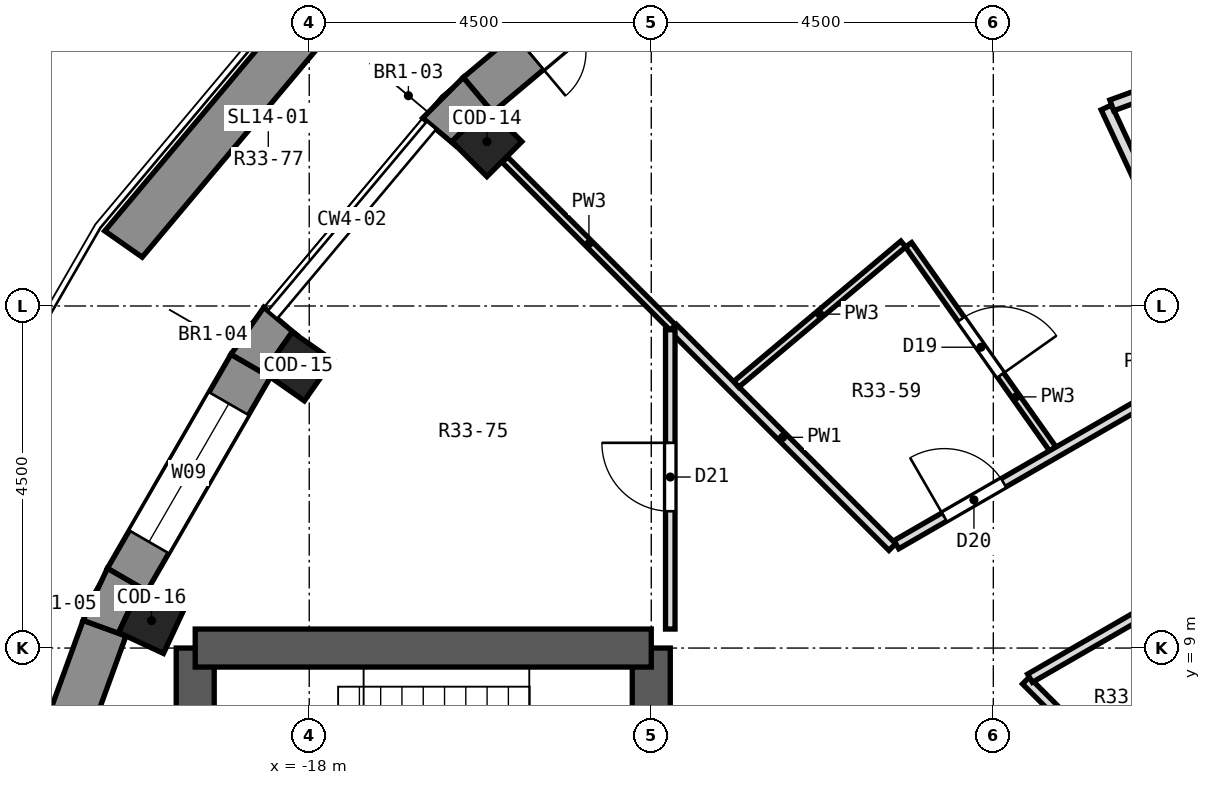
"""IFC4 building model, lengths in metres.
Left out: names, types, materials, properties, quantities, classifications, styles, units other than length and angle.
Written with IfcOpenShell. Run it as: python <this file> out.ifc"""

import sys

from ifc_helpers import new_model, si_unit, direction, frame, frame_2d, origin, origin_2d, place, context, subcontext, project, spatial, polyline, rectangle, outline, extrude, element, fill, save


model = new_model("IFC4")
c1 = context("Model", 3, precision=1e-05, world=origin(), true_north=direction((0.0, 1.0)))
c2 = subcontext(c1, "Body", "Model", "MODEL_VIEW")
j1 = project(units=[si_unit("LENGTHUNIT", "METRE"), si_unit("PLANEANGLEUNIT", "RADIAN")], contexts=[c1])
p1 = place(None, origin())
s1 = spatial("IfcSite", under=j1, at=p1, CompositionType="ELEMENT")
p2 = place(p1, origin())
s2 = spatial("IfcBuilding", under=s1, at=p2, CompositionType="ELEMENT")
p3 = place(p2, frame((0.0, 0.0, 229.7)))
s3 = spatial("IfcBuildingStorey", under=s2, at=p3, CompositionType="ELEMENT", Elevation=229.7)
for number, where, z_axis, x_axis in (
    (1, (-15.662, 15.662, 0.0), (0.0, 0.0, 1.0), (-0.707, 0.707, 0.0)),
    (2, (-18.144, 12.705, 0.0), (0.0, 0.0, 1.0), (-0.819, 0.574, 0.0)),
    (3, (-20.075, 9.361, 0.0), (0.0, 0.0, 1.0), (-0.906, 0.423, 0.0)),
):
    element("IfcColumn", number, at=place(p3, frame(where, z_axis=z_axis, x_axis=x_axis)), inside=s3, PredefinedType="COLUMN", context=c2, shape_type="SweptSolid", body=[
        extrude(rectangle(XDim=0.65, YDim=0.65, at=origin_2d()), origin(), (0.0, 0.0, 1.0), 3.3),
    ])
p4 = place(p3, frame((-13.5, -9.0, 0.0), z_axis=(0.0, 0.0, 1.0), x_axis=(0.0, 1.0, 0.0)))
e4 = element("IfcWall", 4, at=p4, inside=s3, PredefinedType="SHEAR", context=c2, shape_type="SweptSolid", body=[
    extrude(rectangle(XDim=18.0, YDim=0.5, at=frame_2d((9.0, 0.0))), origin(), (0.0, 0.0, 1.0), 3.3),
])
p5 = place(p4, frame((15.4, 0.0, 0.0)))
e5 = element("IfcOpeningElement", 5, at=p5, cuts=e4, PredefinedType="OPENING", context=c2, shape_type="SweptSolid", body=[
    extrude(rectangle(XDim=1.2, YDim=2.1, at=frame_2d((0.6, 1.05))), frame((0.0, 0.262, 0.0), z_axis=(0.0, -1.0, 0.0), x_axis=(1.0, 0.0, 0.0)), (0.0, 0.0, 1.0), 0.524),
])
p6 = place(p4, frame((1.4, 0.0, 0.0)))
e6 = element("IfcOpeningElement", 6, at=p6, cuts=e4, PredefinedType="OPENING", context=c2, shape_type="SweptSolid", body=[
    extrude(rectangle(XDim=1.2, YDim=2.1, at=frame_2d((0.6, 1.05))), frame((0.0, 0.262, 0.0), z_axis=(0.0, -1.0, 0.0), x_axis=(1.0, 0.0, 0.0)), (0.0, 0.0, 1.0), 0.524),
])
p7 = place(p4, frame((7.5, 0.0, 0.0)))
e7 = element("IfcOpeningElement", 7, at=p7, cuts=e4, PredefinedType="OPENING", context=c2, shape_type="SweptSolid", body=[
    extrude(rectangle(XDim=3.0, YDim=2.4, at=frame_2d((1.5, 1.2))), frame((0.0, 0.262, 0.0), z_axis=(0.0, -1.0, 0.0), x_axis=(1.0, 0.0, 0.0)), (0.0, 0.0, 1.0), 0.524),
])
p8 = place(p3, frame((-19.5, -9.0, 0.0), z_axis=(0.0, 0.0, 1.0), x_axis=(0.0, 1.0, 0.0)))
e8 = element("IfcWall", 8, at=p8, inside=s3, PredefinedType="SHEAR", context=c2, shape_type="SweptSolid", body=[
    extrude(rectangle(XDim=18.0, YDim=0.5, at=frame_2d((9.0, 0.0))), origin(), (0.0, 0.0, 1.0), 3.3),
])
p9 = place(p8, frame((9.45, 0.0, 0.0)))
e9 = element("IfcOpeningElement", 9, at=p9, cuts=e8, PredefinedType="OPENING", context=c2, shape_type="SweptSolid", body=[
    extrude(rectangle(XDim=0.9, YDim=2.1, at=frame_2d((0.45, 1.05))), frame((0.0, 0.262, 0.0), z_axis=(0.0, -1.0, 0.0), x_axis=(1.0, 0.0, 0.0)), (0.0, 0.0, 1.0), 0.524),
])
p10 = place(p8, frame((7.65, 0.0, 0.0)))
e10 = element("IfcOpeningElement", 10, at=p10, cuts=e8, PredefinedType="OPENING", context=c2, shape_type="SweptSolid", body=[
    extrude(rectangle(XDim=0.9, YDim=2.1, at=frame_2d((0.45, 1.05))), frame((0.0, 0.262, 0.0), z_axis=(0.0, -1.0, 0.0), x_axis=(1.0, 0.0, 0.0)), (0.0, 0.0, 1.0), 0.524),
])
p11 = place(p3, frame((-13.5, 9.0, 0.0), z_axis=(0.0, 0.0, 1.0), x_axis=(-1.0, 0.0, 0.0)))
e11 = element("IfcWall", 11, at=p11, inside=s3, PredefinedType="SHEAR", context=c2, shape_type="SweptSolid", body=[
    extrude(rectangle(XDim=6.0, YDim=0.5, at=frame_2d((3.0, 0.0))), origin(), (0.0, 0.0, 1.0), 3.3),
])
p12 = place(p3, frame((-13.29, 18.367, 0.0), z_axis=(0.0, 0.0, 1.0), x_axis=(-0.766056773982, -0.64277291405, 0.0)))
e12 = element("IfcWall", 12, at=p12, inside=s3, PredefinedType="SOLIDWALL", context=c2, shape_type="SweptSolid", body=[
    extrude(rectangle(XDim=3.252, YDim=0.6, at=frame_2d((1.626, 0.0))), origin(), (0.0, 0.0, 1.0), 2.9),
])
p13 = place(p12, frame((0.876, 0.0, 0.0)))
e13 = element("IfcOpeningElement", 13, at=p13, cuts=e12, PredefinedType="OPENING", context=c2, shape_type="SweptSolid", body=[
    extrude(rectangle(XDim=1.5, YDim=2.4, at=frame_2d((0.75, 1.2))), frame((0.0, 0.312, 0.0), z_axis=(0.0, -1.0, 0.0), x_axis=(1.0, 0.0, 0.0)), (0.0, 0.0, 1.0), 0.624),
])
p14 = place(p3, frame((-18.77, 12.714, 0.0), z_axis=(0.0, 0.0, 1.0), x_axis=(-0.500014901547, -0.866016800201, 0.0)))
e14 = element("IfcWall", 14, at=p14, inside=s3, PredefinedType="SOLIDWALL", context=c2, shape_type="SweptSolid", body=[
    extrude(rectangle(XDim=3.252, YDim=0.6, at=frame_2d((1.626, 0.0))), origin(), (0.0, 0.0, 1.0), 2.9),
])
p15 = place(p14, frame((0.576, 0.0, 0.9)))
e15 = element("IfcOpeningElement", 15, at=p15, cuts=e14, PredefinedType="OPENING", context=c2, shape_type="SweptSolid", body=[
    extrude(rectangle(XDim=2.1, YDim=1.8, at=frame_2d((1.05, 0.9))), frame((0.0, 0.312, 0.0), z_axis=(0.0, -1.0, 0.0), x_axis=(1.0, 0.0, 0.0)), (0.0, 0.0, 1.0), 0.624),
])
p16 = place(p3, frame((-20.693, 9.262, 0.0), z_axis=(0.0, 0.0, 1.0), x_axis=(-0.342056509473, -0.939679383794, 0.0)))
e16 = element("IfcWall", 16, at=p16, inside=s3, PredefinedType="SOLIDWALL", context=c2, shape_type="SweptSolid", body=[
    extrude(rectangle(XDim=3.252, YDim=0.6, at=frame_2d((1.626, 0.0))), origin(), (0.0, 0.0, 1.0), 2.9),
])
p17 = place(p3, origin())
e17 = element("IfcWall", 17, at=p17, inside=s3, PredefinedType="SOLIDWALL", context=c2, shape_type="SweptSolid", body=[
    extrude(outline(polyline([(-16.507, 15.973), (-16.047, 15.588), (-16.122, 15.662), (-15.662, 16.122), (-15.588, 16.047), (-15.973, 16.507), (-16.507, 15.973)])), origin(), (0.0, 0.0, 1.0), 2.9),
])
p18 = place(p3, origin())
e18 = element("IfcWall", 18, at=p18, inside=s3, PredefinedType="SOLIDWALL", context=c2, shape_type="SweptSolid", body=[
    extrude(outline(polyline([(-19.03, 12.864), (-18.51, 12.564), (-18.597, 12.625), (-18.224, 13.157), (-18.137, 13.097), (-18.597, 13.482), (-19.03, 12.864)])), origin(), (0.0, 0.0, 1.0), 2.9),
])
p19 = place(p3, origin())
e19 = element("IfcWall", 19, at=p19, inside=s3, PredefinedType="SOLIDWALL", context=c2, shape_type="SweptSolid", body=[
    extrude(outline(polyline([(-20.656, 10.048), (-20.975, 9.364), (-20.411, 9.159), (-20.507, 9.204), (-20.232, 9.793), (-20.136, 9.748), (-20.656, 10.048)])), origin(), (0.0, 0.0, 1.0), 2.9),
])
p20 = place(p3, origin())
e20 = element("IfcWall", 20, at=p20, inside=s3, PredefinedType="PARAPET", context=c2, shape_type="SweptSolid", body=[
    extrude(outline(polyline([(-14.488, 20.691), (-17.861, 17.861), (-20.691, 14.488), (-20.197, 14.142), (-17.435, 17.435), (-14.142, 20.197), (-14.488, 20.691)])), origin(), (0.0, 0.0, 1.0), 0.5),
])
p21 = place(p3, frame((-7.513, 16.112, 0.0), z_axis=(0.0, 0.0, 1.0), x_axis=(0.42248263036, -0.906371020634, 0.0)))
e21 = element("IfcWall", 21, at=p21, inside=s3, PredefinedType="PARTITIONING", context=c2, shape_type="SweptSolid", body=[
    extrude(rectangle(XDim=3.551, YDim=0.15, at=frame_2d((1.775, 0.0))), origin(), (0.0, 0.0, 1.0), 2.9),
])
p22 = place(p3, frame((-10.116, 14.305, 0.0), z_axis=(0.0, 0.0, 1.0), x_axis=(0.577184589489, -0.816613708957, 0.0)))
e22 = element("IfcWall", 22, at=p22, inside=s3, PredefinedType="PARTITIONING", context=c2, shape_type="SweptSolid", body=[
    extrude(rectangle(XDim=3.287, YDim=0.1, at=frame_2d((1.644, 0.0))), origin(), (0.0, 0.0, 1.0), 2.9),
])
p23 = place(p22, frame((1.2, 0.0, 0.0)))
e23 = element("IfcOpeningElement", 23, at=p23, cuts=e22, PredefinedType="OPENING", context=c2, shape_type="SweptSolid", body=[
    extrude(rectangle(XDim=0.9, YDim=2.1, at=frame_2d((0.45, 1.05))), frame((0.0, 0.062, 0.0), z_axis=(0.0, -1.0, 0.0), x_axis=(1.0, 0.0, 0.0)), (0.0, 0.0, 1.0), 0.124),
])
p24 = place(p3, frame((-15.426, 15.426, 0.0), z_axis=(0.0, 0.0, 1.0), x_axis=(0.707106781187, -0.707106781187, 0.0)))
e24 = element("IfcWall", 24, at=p24, inside=s3, PredefinedType="PARTITIONING", context=c2, shape_type="SweptSolid", body=[
    extrude(rectangle(XDim=3.127, YDim=0.1, at=frame_2d((1.563, 0.0))), origin(), (0.0, 0.0, 1.0), 2.9),
])
p25 = place(p3, frame((-13.215, 13.215, 0.0), z_axis=(0.0, 0.0, 1.0), x_axis=(0.707106781187, -0.707106781187, 0.0)))
e25 = element("IfcWall", 25, at=p25, inside=s3, PredefinedType="PARTITIONING", context=c2, shape_type="SweptSolid", body=[
    extrude(rectangle(XDim=4.081, YDim=0.125, at=frame_2d((2.041, 0.0))), origin(), (0.0, 0.0, 1.0), 2.9),
])
p26 = place(p3, frame((-8.572, 8.572, 0.0), z_axis=(0.0, 0.0, 1.0), x_axis=(0.707106781187, -0.707106781187, 0.0)))
e26 = element("IfcWall", 26, at=p26, inside=s3, PredefinedType="PARTITIONING", context=c2, shape_type="SweptSolid", body=[
    extrude(rectangle(XDim=2.68, YDim=0.125, at=frame_2d((1.34, 0.0))), origin(), (0.0, 0.0, 1.0), 2.9),
])
p27 = place(p3, frame((-7.442, 16.14, 0.0), z_axis=(0.0, 0.0, 1.0), x_axis=(0.939459000347, 0.342661329401, 0.0)))
e27 = element("IfcWall", 27, at=p27, inside=s3, PredefinedType="PARTITIONING", context=c2, shape_type="SweptSolid", body=[
    extrude(rectangle(XDim=2.945, YDim=0.15, at=frame_2d((1.473, 0.0))), origin(), (0.0, 0.0, 1.0), 2.9),
])
p28 = place(p27, frame((1.023, 0.0, 0.0)))
e28 = element("IfcOpeningElement", 28, at=p28, cuts=e27, PredefinedType="OPENING", context=c2, shape_type="SweptSolid", body=[
    extrude(rectangle(XDim=0.9, YDim=2.1, at=frame_2d((0.45, 1.05))), frame((0.0, 0.087, 0.0), z_axis=(0.0, -1.0, 0.0), x_axis=(1.0, 0.0, 0.0)), (0.0, 0.0, 1.0), 0.174),
])
p29 = place(p3, frame((-8.518, 8.603, 0.0), z_axis=(0.0, 0.0, 1.0), x_axis=(0.865972267571, 0.50009202333, 0.0)))
e29 = element("IfcWall", 29, at=p29, inside=s3, PredefinedType="PARTITIONING", context=c2, shape_type="SweptSolid", body=[
    extrude(rectangle(XDim=6.137, YDim=0.125, at=frame_2d((3.069, 0.0))), origin(), (0.0, 0.0, 1.0), 2.9),
])
p30 = place(p29, frame((2.524, 0.0, 0.0)))
e30 = element("IfcOpeningElement", 30, at=p30, cuts=e29, PredefinedType="OPENING", context=c2, shape_type="SweptSolid", body=[
    extrude(rectangle(XDim=1.0, YDim=2.1, at=frame_2d((0.5, 1.05))), frame((0.0, 0.074, 0.0), z_axis=(0.0, -1.0, 0.0), x_axis=(1.0, 0.0, 0.0)), (0.0, 0.0, 1.0), 0.149),
])
p31 = place(p3, frame((-10.275, 10.36, 0.0), z_axis=(0.0, 0.0, 1.0), x_axis=(0.865993671729, 0.500054957505, 0.0)))
e31 = element("IfcWall", 31, at=p31, inside=s3, PredefinedType="PARTITIONING", context=c2, shape_type="SweptSolid", body=[
    extrude(rectangle(XDim=7.436, YDim=0.125, at=frame_2d((3.718, 0.0))), origin(), (0.0, 0.0, 1.0), 2.9),
])
p32 = place(p31, frame((0.728, 0.0, 0.0)))
e32 = element("IfcOpeningElement", 32, at=p32, cuts=e31, PredefinedType="OPENING", context=c2, shape_type="SweptSolid", body=[
    extrude(rectangle(XDim=0.9, YDim=2.1, at=frame_2d((0.45, 1.05))), frame((0.0, 0.074, 0.0), z_axis=(0.0, -1.0, 0.0), x_axis=(1.0, 0.0, 0.0)), (0.0, 0.0, 1.0), 0.149),
])
p33 = place(p3, frame((-12.382, 12.47, 0.0), z_axis=(0.0, 0.0, 1.0), x_axis=(0.765817138438, 0.643058403627, 0.0)))
e33 = element("IfcWall", 33, at=p33, inside=s3, PredefinedType="PARTITIONING", context=c2, shape_type="SweptSolid", body=[
    extrude(rectangle(XDim=2.87, YDim=0.1, at=frame_2d((1.435, 0.0))), origin(), (0.0, 0.0, 1.0), 2.9),
])
p34 = place(p3, frame((-13.25, 9.25, 0.0), z_axis=(0.0, 0.0, 1.0), x_axis=(0.0, 1.0, 0.0)))
e34 = element("IfcWall", 34, at=p34, inside=s3, PredefinedType="PARTITIONING", context=c2, shape_type="SweptSolid", body=[
    extrude(rectangle(XDim=3.938, YDim=0.125, at=frame_2d((1.969, 0.0))), origin(), (0.0, 0.0, 1.0), 2.9),
])
p35 = place(p34, frame((1.55, 0.0, 0.0)))
e35 = element("IfcOpeningElement", 35, at=p35, cuts=e34, PredefinedType="OPENING", context=c2, shape_type="SweptSolid", body=[
    extrude(rectangle(XDim=0.9, YDim=2.1, at=frame_2d((0.45, 1.05))), frame((0.0, 0.074, 0.0), z_axis=(0.0, -1.0, 0.0), x_axis=(1.0, 0.0, 0.0)), (0.0, 0.0, 1.0), 0.149),
])
p36 = place(p13, origin())
e36 = element("IfcDoor", 36, at=p36, inside=s3, OperationType="DOUBLE_DOOR_SINGLE_SWING", PredefinedType="DOOR", context=c2, shape_type="SweptSolid", body=[
    extrude(rectangle(XDim=1.5, YDim=2.4, at=frame_2d((0.75, 1.2))), frame((0.0, 0.125, 0.0), z_axis=(0.0, -1.0, 0.0), x_axis=(1.0, 0.0, 0.0)), (0.0, 0.0, 1.0), 0.05),
])
fill(e13, e36)
p37 = place(p15, origin())
e37 = element("IfcWindow", 37, at=p37, inside=s3, PartitioningType="SINGLE_PANEL", PredefinedType="WINDOW", context=c2, shape_type="SweptSolid", body=[
    extrude(rectangle(XDim=2.1, YDim=1.8, at=frame_2d((1.05, 0.9))), frame((0.0, 0.18, 0.0), z_axis=(0.0, -1.0, 0.0), x_axis=(1.0, 0.0, 0.0)), (0.0, 0.0, 1.0), 0.06),
])
fill(e15, e37)
p38 = place(p23, origin())
e38 = element("IfcDoor", 38, at=p38, inside=s3, OperationType="SINGLE_SWING_RIGHT", PredefinedType="DOOR", context=c2, shape_type="SweptSolid", body=[
    extrude(rectangle(XDim=0.9, YDim=2.1, at=frame_2d((0.45, 1.05))), frame((0.0, 0.025, 0.0), z_axis=(0.0, -1.0, 0.0), x_axis=(1.0, 0.0, 0.0)), (0.0, 0.0, 1.0), 0.05),
])
fill(e23, e38)
p39 = place(p32, origin())
e39 = element("IfcDoor", 39, at=p39, inside=s3, OperationType="SINGLE_SWING_LEFT", PredefinedType="DOOR", context=c2, shape_type="SweptSolid", body=[
    extrude(rectangle(XDim=0.9, YDim=2.1, at=frame_2d((0.45, 1.05))), frame((0.0, 0.025, 0.0), z_axis=(0.0, -1.0, 0.0), x_axis=(1.0, 0.0, 0.0)), (0.0, 0.0, 1.0), 0.05),
])
fill(e32, e39)
p40 = place(p35, origin())
e40 = element("IfcDoor", 40, at=p40, inside=s3, OperationType="SINGLE_SWING_RIGHT", PredefinedType="DOOR", context=c2, shape_type="SweptSolid", body=[
    extrude(rectangle(XDim=0.9, YDim=2.1, at=frame_2d((0.45, 1.05))), frame((0.0, 0.025, 0.0), z_axis=(0.0, -1.0, 0.0), x_axis=(1.0, 0.0, 0.0)), (0.0, 0.0, 1.0), 0.05),
])
fill(e35, e40)
save(model, sys.argv[1])
